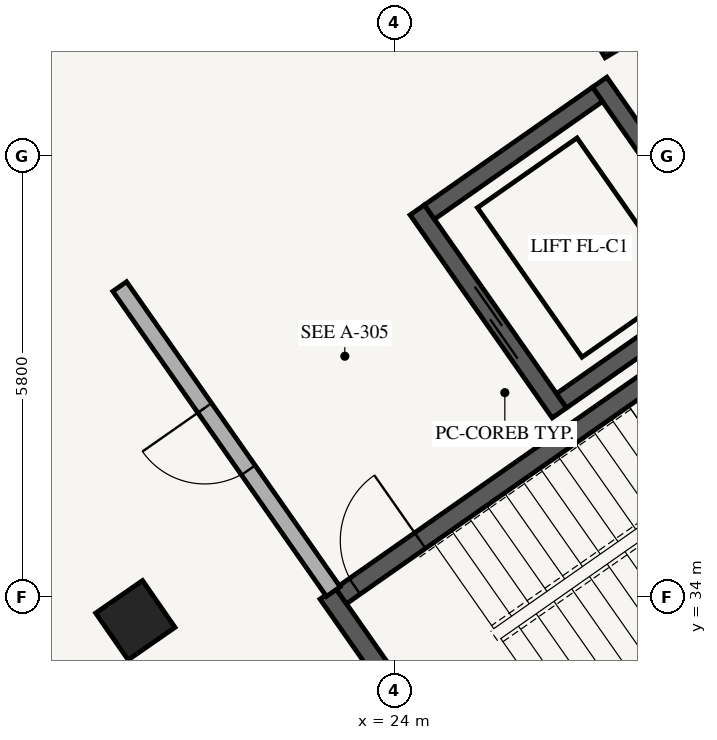
"""IFC4 building model, lengths in metres.
Left out: names, types, materials, properties, quantities, classifications, styles, units other than length and angle.
Written with IfcOpenShell. Run it as: python <this file> out.ifc"""

import sys

from ifc_helpers import new_model, si_unit, direction, frame, frame_2d, origin, origin_2d, place, context, subcontext, project, spatial, rectangle, extrude, element, fill, save


model = new_model("IFC4")
c1 = context("Model", 3, precision=1e-05, world=origin(), true_north=direction((0.0, 1.0)))
c2 = subcontext(c1, "Body", "Model", "MODEL_VIEW")
j1 = project(units=[si_unit("LENGTHUNIT", "METRE"), si_unit("PLANEANGLEUNIT", "RADIAN")], contexts=[c1])
p1 = place(None, origin())
s1 = spatial("IfcSite", under=j1, at=p1, CompositionType="ELEMENT")
p2 = place(p1, origin())
s2 = spatial("IfcBuilding", under=s1, at=p2, CompositionType="ELEMENT")
p3 = place(p2, frame((0.0, 0.0, -4.2)))
s3 = spatial("IfcBuildingStorey", under=s2, at=p3, CompositionType="ELEMENT", Elevation=-4.2)
p4 = place(p3, frame((25.114, 31.414, 0.0), z_axis=(0.0, 0.0, 1.0), x_axis=(0.819141541656, 0.573591435374, 0.0)))
e1 = element("IfcWall", 1, at=p4, inside=s3, PredefinedType="SHEAR", context=c2, shape_type="SweptSolid", body=[
    extrude(rectangle(XDim=6.6, YDim=0.25, at=frame_2d((3.3, 0.0))), origin(), (0.0, 0.0, 1.0), 3.92),
])
p5 = place(p3, frame((25.083, 31.24, 0.0), z_axis=(0.0, 0.0, 1.0), x_axis=(-0.573582112484, 0.819148069789, 0.0)))
e2 = element("IfcWall", 2, at=p5, inside=s3, PredefinedType="SHEAR", context=c2, shape_type="SweptSolid", body=[
    extrude(rectangle(XDim=3.42, YDim=0.25, at=frame_2d((1.71, 0.0))), origin(), (0.0, 0.0, 1.0), 3.92),
])
p6 = place(p3, frame((23.296, 34.01, 0.0), z_axis=(0.0, 0.0, 1.0), x_axis=(0.819153711596, 0.573574055182, 0.0)))
e3 = element("IfcWall", 3, at=p6, inside=s3, PredefinedType="SHEAR", context=c2, shape_type="SweptSolid", body=[
    extrude(rectangle(XDim=6.6, YDim=0.25, at=frame_2d((3.3, 0.0))), origin(), (0.0, 0.0, 1.0), 3.92),
])
p7 = place(p6, frame((0.22, 0.0, 0.0)))
e4 = element("IfcOpeningElement", 4, at=p7, cuts=e3, PredefinedType="OPENING", context=c2, shape_type="SweptSolid", body=[
    extrude(rectangle(XDim=1.05, YDim=2.15, at=frame_2d((0.525, 1.075))), frame((0.0, 0.135, 0.0), z_axis=(0.0, -1.0, 0.0), x_axis=(1.0, 0.0, 0.0)), (0.0, 0.0, 1.0), 0.27),
])
p8 = place(p3, frame((26.169, 36.419, 0.0), z_axis=(0.0, 0.0, 1.0), x_axis=(-0.573582966431, 0.819147471839, 0.0)))
e5 = element("IfcWall", 5, at=p8, inside=s3, PredefinedType="SHEAR", context=c2, shape_type="SweptSolid", body=[
    extrude(rectangle(XDim=3.26, YDim=0.23, at=frame_2d((1.63, 0.0))), origin(), (0.0, 0.0, 1.0), 3.92),
])
p9 = place(p8, frame((0.9, 0.0, 0.0)))
e6 = element("IfcOpeningElement", 6, at=p9, cuts=e5, PredefinedType="OPENING", context=c2, shape_type="SweptSolid", body=[
    extrude(rectangle(XDim=1.1, YDim=2.15, at=frame_2d((0.55, 1.075))), frame((0.0, 0.125, 0.0), z_axis=(0.0, -1.0, 0.0), x_axis=(1.0, 0.0, 0.0)), (0.0, 0.0, 1.0), 0.25),
])
p10 = place(p3, frame((28.569, 38.1, 0.0), z_axis=(0.0, 0.0, 1.0), x_axis=(-0.573582966431, 0.819147471839, 0.0)))
e7 = element("IfcWall", 7, at=p10, inside=s3, PredefinedType="SHEAR", context=c2, shape_type="SweptSolid", body=[
    extrude(rectangle(XDim=3.26, YDim=0.23, at=frame_2d((1.63, 0.0))), origin(), (0.0, 0.0, 1.0), 3.92),
])
p11 = place(p3, frame((26.197, 36.579, 0.0), z_axis=(0.0, 0.0, 1.0), x_axis=(0.819159695432, 0.573565509231, 0.0)))
e8 = element("IfcWall", 8, at=p11, inside=s3, PredefinedType="SHEAR", context=c2, shape_type="SweptSolid", body=[
    extrude(rectangle(XDim=2.7, YDim=0.23, at=frame_2d((1.35, 0.0))), origin(), (0.0, 0.0, 1.0), 3.92),
])
p12 = place(p3, frame((24.459, 39.061, 0.0), z_axis=(0.0, 0.0, 1.0), x_axis=(0.819189439894, 0.573523026186, 0.0)))
e9 = element("IfcWall", 9, at=p12, inside=s3, PredefinedType="SHEAR", context=c2, shape_type="SweptSolid", body=[
    extrude(rectangle(XDim=2.7, YDim=0.23, at=frame_2d((1.35, 0.0))), origin(), (0.0, 0.0, 1.0), 3.92),
])
for number, where, z_axis, x_axis in (
    (10, (26.899, 41.606, 0.0), (0.0, 0.0, 1.0), (-0.857, -0.515, 0.0)),
    (11, (20.59, 33.692, 0.0), (0.0, 0.0, 1.0), (-0.822, -0.57, 0.0)),
):
    element("IfcColumn", number, at=place(p3, frame(where, z_axis=z_axis, x_axis=x_axis)), inside=s3, PredefinedType="COLUMN", context=c2, shape_type="SweptSolid", body=[
        extrude(rectangle(XDim=0.75, YDim=0.75, at=origin_2d()), origin(), (0.0, 0.0, 1.0), 3.92),
    ])
p13 = place(p3, frame((23.195, 34.068, 0.0), z_axis=(0.0, 0.0, 1.0), x_axis=(-0.573572687386, 0.819154669329, 0.0)))
e12 = element("IfcWall", 12, at=p13, inside=s3, PredefinedType="PARTITIONING", context=c2, shape_type="SweptSolid", body=[
    extrude(rectangle(XDim=4.9, YDim=0.22, at=frame_2d((2.45, 0.0))), origin(), (0.0, 0.0, 1.0), 3.18),
])
p14 = place(p13, frame((1.95, 0.0, 0.0)))
e13 = element("IfcOpeningElement", 13, at=p14, cuts=e12, PredefinedType="OPENING", context=c2, shape_type="SweptSolid", body=[
    extrude(rectangle(XDim=1.0, YDim=2.15, at=frame_2d((0.5, 1.075))), frame((0.0, 0.12, 0.0), z_axis=(0.0, -1.0, 0.0), x_axis=(1.0, 0.0, 0.0)), (0.0, 0.0, 1.0), 0.24),
])
p15 = place(p7, origin())
e14 = element("IfcDoor", 14, at=p15, inside=s3, OperationType="SINGLE_SWING_RIGHT", PredefinedType="DOOR", context=c2, shape_type="SweptSolid", body=[
    extrude(rectangle(XDim=1.05, YDim=2.15, at=frame_2d((0.525, 1.075))), frame((0.0, 0.025, 0.0), z_axis=(0.0, -1.0, 0.0), x_axis=(1.0, 0.0, 0.0)), (0.0, 0.0, 1.0), 0.05),
])
fill(e4, e14)
p16 = place(p9, origin())
e15 = element("IfcDoor", 15, at=p16, inside=s3, OperationType="DOUBLE_DOOR_SLIDING", PredefinedType="DOOR", context=c2, shape_type="SweptSolid", body=[
    extrude(rectangle(XDim=1.1, YDim=2.15, at=frame_2d((0.55, 1.075))), frame((0.0, 0.025, 0.0), z_axis=(0.0, -1.0, 0.0), x_axis=(1.0, 0.0, 0.0)), (0.0, 0.0, 1.0), 0.05),
])
fill(e6, e15)
p17 = place(p14, origin())
e16 = element("IfcDoor", 16, at=p17, inside=s3, OperationType="SINGLE_SWING_RIGHT", PredefinedType="DOOR", context=c2, shape_type="SweptSolid", body=[
    extrude(rectangle(XDim=1.0, YDim=2.15, at=frame_2d((0.5, 1.075))), frame((0.0, 0.025, 0.0), z_axis=(0.0, -1.0, 0.0), x_axis=(1.0, 0.0, 0.0)), (0.0, 0.0, 1.0), 0.05),
])
fill(e13, e16)
save(model, sys.argv[1])
